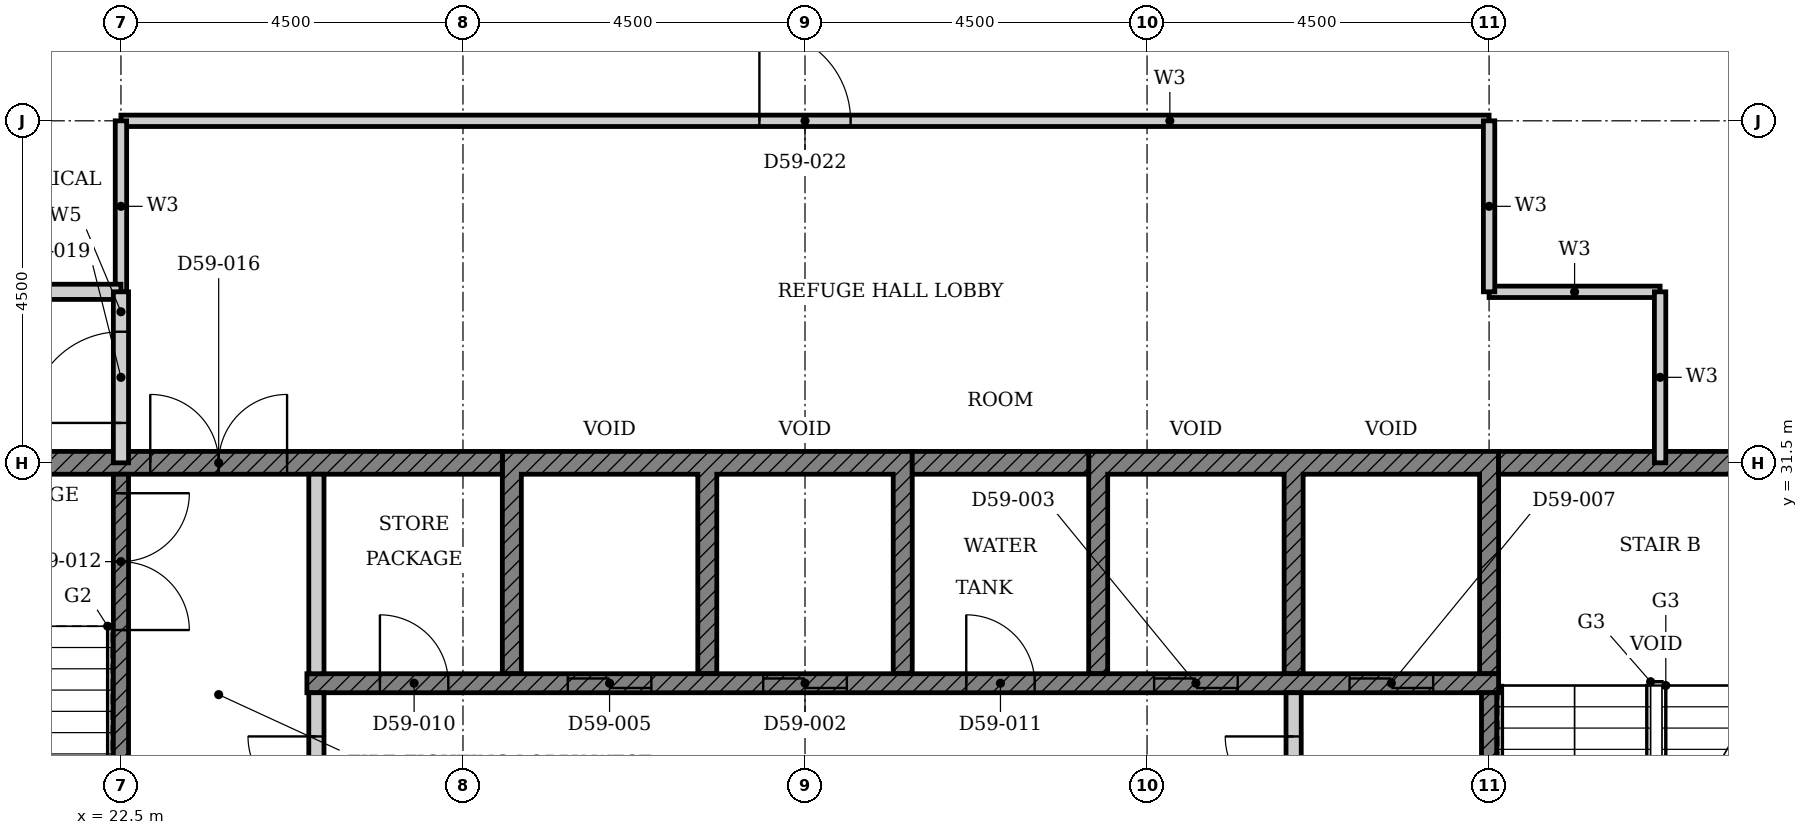
"""IFC4 building model, lengths in metres.
Left out: names, types, materials, properties, quantities, classifications, styles, units other than length and angle.
Written with IfcOpenShell. Run it as: python <this file> out.ifc"""

import sys

from ifc_helpers import new_model, si_unit, direction, frame, frame_2d, origin, place, context, subcontext, project, spatial, polyline, rectangle, outline, extrude, element, fill, save


model = new_model("IFC4")
c1 = context("Model", 3, precision=1e-05, world=origin(), true_north=direction((0.0, 1.0)))
c2 = subcontext(c1, "Body", "Model", "MODEL_VIEW")
j1 = project(units=[si_unit("LENGTHUNIT", "METRE"), si_unit("PLANEANGLEUNIT", "RADIAN")], contexts=[c1])
p1 = place(None, origin())
s1 = spatial("IfcSite", under=j1, at=p1, CompositionType="ELEMENT")
p2 = place(p1, origin())
s2 = spatial("IfcBuilding", under=s1, at=p2, CompositionType="ELEMENT")
p3 = place(p2, frame((0.0, 0.0, 233.1)))
s3 = spatial("IfcBuildingStorey", under=s2, at=p3, CompositionType="ELEMENT", Elevation=233.1)
p4 = place(p3, origin())
e1 = element("IfcWall", 1, at=p4, inside=s3, PredefinedType="SHEAR", context=c2, shape_type="SweptSolid", body=[
    extrude(outline(polyline([(27.518, 28.725), (27.768, 28.725), (27.768, 31.35), (30.089, 31.35), (30.089, 28.725), (30.339, 28.725), (30.339, 31.35), (32.661, 31.35), (32.661, 28.725), (32.911, 28.725), (32.911, 31.65), (27.518, 31.65), (27.518, 28.725)])), origin(), (0.0, 0.0, 1.0), 4.5),
])
p5 = place(p3, origin())
e2 = element("IfcWall", 2, at=p5, inside=s3, PredefinedType="SHEAR", context=c2, shape_type="SweptSolid", body=[
    extrude(outline(polyline([(35.232, 28.725), (35.482, 28.725), (35.482, 31.35), (37.803, 31.35), (37.803, 28.725), (38.053, 28.725), (38.053, 31.35), (40.375, 31.35), (40.375, 28.725), (40.625, 28.725), (40.625, 31.65), (35.232, 31.65), (35.232, 28.725)])), origin(), (0.0, 0.0, 1.0), 4.5),
])
p6 = place(p3, frame((18.15, 31.5, 0.0), z_axis=(0.0, 0.0, 1.0), x_axis=(1.0, 0.0, 0.0)))
e3 = element("IfcWall", 3, at=p6, inside=s3, PredefinedType="SHEAR", context=c2, shape_type="SweptSolid", body=[
    extrude(rectangle(XDim=9.368, YDim=0.3, at=frame_2d((4.684, 0.0))), origin(), (0.0, 0.0, 1.0), 4.5),
])
p7 = place(p6, frame((4.736, 0.0, 0.0)))
e4 = element("IfcOpeningElement", 4, at=p7, cuts=e3, PredefinedType="OPENING", context=c2, shape_type="SweptSolid", body=[
    extrude(rectangle(XDim=1.8, YDim=2.1, at=frame_2d((0.9, 1.05))), frame((0.0, 0.16, 0.0), z_axis=(0.0, -1.0, 0.0), x_axis=(1.0, 0.0, 0.0)), (0.0, 0.0, 1.0), 0.32),
])
p8 = place(p3, frame((32.911, 31.5, 0.0), z_axis=(0.0, 0.0, 1.0), x_axis=(1.0, 0.0, 0.0)))
e5 = element("IfcWall", 5, at=p8, inside=s3, PredefinedType="SHEAR", context=c2, shape_type="SweptSolid", body=[
    extrude(rectangle(XDim=2.322, YDim=0.3, at=frame_2d((1.161, 0.0))), origin(), (0.0, 0.0, 1.0), 4.5),
])
p9 = place(p3, frame((40.625, 31.5, 0.0), z_axis=(0.0, 0.0, 1.0), x_axis=(1.0, 0.0, 0.0)))
e6 = element("IfcWall", 6, at=p9, inside=s3, PredefinedType="SHEAR", context=c2, shape_type="SweptSolid", body=[
    extrude(rectangle(XDim=4.225, YDim=0.3, at=frame_2d((2.113, 0.0))), origin(), (0.0, 0.0, 1.0), 4.5),
])
p10 = place(p3, frame((24.947, 28.6, 0.0), z_axis=(0.0, 0.0, 1.0), x_axis=(1.0, 0.0, 0.0)))
e7 = element("IfcWall", 7, at=p10, inside=s3, PredefinedType="SHEAR", context=c2, shape_type="SweptSolid", body=[
    extrude(rectangle(XDim=15.678, YDim=0.25, at=frame_2d((7.839, 0.0))), origin(), (0.0, 0.0, 1.0), 4.5),
])
p11 = place(p10, frame((6.004, 0.0, 0.0)))
e8 = element("IfcOpeningElement", 8, at=p11, cuts=e7, PredefinedType="OPENING", context=c2, shape_type="SweptSolid", body=[
    extrude(rectangle(XDim=1.1, YDim=2.1, at=frame_2d((0.55, 1.05))), frame((0.0, 0.135, 0.0), z_axis=(0.0, -1.0, 0.0), x_axis=(1.0, 0.0, 0.0)), (0.0, 0.0, 1.0), 0.27),
])
p12 = place(p10, frame((11.146, 0.0, 0.0)))
e9 = element("IfcOpeningElement", 9, at=p12, cuts=e7, PredefinedType="OPENING", context=c2, shape_type="SweptSolid", body=[
    extrude(rectangle(XDim=1.1, YDim=2.1, at=frame_2d((0.55, 1.05))), frame((0.0, 0.135, 0.0), z_axis=(0.0, -1.0, 0.0), x_axis=(1.0, 0.0, 0.0)), (0.0, 0.0, 1.0), 0.27),
])
p13 = place(p10, frame((3.432, 0.0, 0.0)))
e10 = element("IfcOpeningElement", 10, at=p13, cuts=e7, PredefinedType="OPENING", context=c2, shape_type="SweptSolid", body=[
    extrude(rectangle(XDim=1.1, YDim=2.1, at=frame_2d((0.55, 1.05))), frame((0.0, 0.135, 0.0), z_axis=(0.0, -1.0, 0.0), x_axis=(1.0, 0.0, 0.0)), (0.0, 0.0, 1.0), 0.27),
])
p14 = place(p10, frame((13.718, 0.0, 0.0)))
e11 = element("IfcOpeningElement", 11, at=p14, cuts=e7, PredefinedType="OPENING", context=c2, shape_type="SweptSolid", body=[
    extrude(rectangle(XDim=1.1, YDim=2.1, at=frame_2d((0.55, 1.05))), frame((0.0, 0.135, 0.0), z_axis=(0.0, -1.0, 0.0), x_axis=(1.0, 0.0, 0.0)), (0.0, 0.0, 1.0), 0.27),
])
p15 = place(p10, frame((0.961, 0.0, 0.0)))
e12 = element("IfcOpeningElement", 12, at=p15, cuts=e7, PredefinedType="OPENING", context=c2, shape_type="SweptSolid", body=[
    extrude(rectangle(XDim=0.9, YDim=2.1, at=frame_2d((0.45, 1.05))), frame((0.0, 0.135, 0.0), z_axis=(0.0, -1.0, 0.0), x_axis=(1.0, 0.0, 0.0)), (0.0, 0.0, 1.0), 0.27),
])
p16 = place(p10, frame((8.675, 0.0, 0.0)))
e13 = element("IfcOpeningElement", 13, at=p16, cuts=e7, PredefinedType="OPENING", context=c2, shape_type="SweptSolid", body=[
    extrude(rectangle(XDim=0.9, YDim=2.1, at=frame_2d((0.45, 1.05))), frame((0.0, 0.135, 0.0), z_axis=(0.0, -1.0, 0.0), x_axis=(1.0, 0.0, 0.0)), (0.0, 0.0, 1.0), 0.27),
])
p17 = place(p3, frame((25.072, 28.725, 0.0), z_axis=(0.0, 0.0, 1.0), x_axis=(0.0, 1.0, 0.0)))
e14 = element("IfcWall", 14, at=p17, inside=s3, PredefinedType="PARTITIONING", context=c2, shape_type="SweptSolid", body=[
    extrude(rectangle(XDim=2.625, YDim=0.2, at=frame_2d((1.312, 0.0))), origin(), (0.0, 0.0, 1.0), 4.5),
])
p18 = place(p3, frame((22.5, 31.35, 0.0), z_axis=(0.0, 0.0, 1.0), x_axis=(0.0, -1.0, 0.0)))
e15 = element("IfcWall", 15, at=p18, inside=s3, PredefinedType="SHEAR", context=c2, shape_type="SweptSolid", body=[
    extrude(rectangle(XDim=5.825, YDim=0.2, at=frame_2d((2.913, 0.0))), origin(), (0.0, 0.0, 1.0), 4.5),
])
p19 = place(p18, frame((0.25, 0.0, 0.0)))
e16 = element("IfcOpeningElement", 16, at=p19, cuts=e15, PredefinedType="OPENING", context=c2, shape_type="SweptSolid", body=[
    extrude(rectangle(XDim=1.8, YDim=2.1, at=frame_2d((0.9, 1.05))), frame((0.0, 0.11, 0.0), z_axis=(0.0, -1.0, 0.0), x_axis=(1.0, 0.0, 0.0)), (0.0, 0.0, 1.0), 0.22),
])
p20 = place(p3, frame((40.5, 22.65, 0.0), z_axis=(0.0, 0.0, 1.0), x_axis=(0.0, 1.0, 0.0)))
e17 = element("IfcWall", 17, at=p20, inside=s3, PredefinedType="SHEAR", context=c2, shape_type="SweptSolid", body=[
    extrude(rectangle(XDim=5.825, YDim=0.2, at=frame_2d((2.913, 0.0))), origin(), (0.0, 0.0, 1.0), 4.5),
])
p21 = place(p20, frame((0.25, 0.0, 0.0)))
e18 = element("IfcOpeningElement", 18, at=p21, cuts=e17, PredefinedType="OPENING", context=c2, shape_type="SweptSolid", body=[
    extrude(rectangle(XDim=1.8, YDim=2.1, at=frame_2d((0.9, 1.05))), frame((0.0, 0.11, 0.0), z_axis=(0.0, -1.0, 0.0), x_axis=(1.0, 0.0, 0.0)), (0.0, 0.0, 1.0), 0.22),
])
p22 = place(p3, frame((25.072, 25.525, 0.0), z_axis=(0.0, 0.0, 1.0), x_axis=(0.0, 1.0, 0.0)))
e19 = element("IfcWall", 19, at=p22, inside=s3, PredefinedType="PARTITIONING", context=c2, shape_type="SweptSolid", body=[
    extrude(rectangle(XDim=2.95, YDim=0.2, at=frame_2d((1.475, 0.0))), origin(), (0.0, 0.0, 1.0), 4.5),
])
p23 = place(p22, frame((0.575, 0.0, 0.0)))
e20 = element("IfcOpeningElement", 20, at=p23, cuts=e19, PredefinedType="OPENING", context=c2, shape_type="SweptSolid", body=[
    extrude(rectangle(XDim=1.8, YDim=2.1, at=frame_2d((0.9, 1.05))), frame((0.0, 0.11, 0.0), z_axis=(0.0, -1.0, 0.0), x_axis=(1.0, 0.0, 0.0)), (0.0, 0.0, 1.0), 0.22),
])
p24 = place(p3, frame((37.928, 25.525, 0.0), z_axis=(0.0, 0.0, 1.0), x_axis=(0.0, 1.0, 0.0)))
e21 = element("IfcWall", 21, at=p24, inside=s3, PredefinedType="PARTITIONING", context=c2, shape_type="SweptSolid", body=[
    extrude(rectangle(XDim=2.95, YDim=0.2, at=frame_2d((1.475, 0.0))), origin(), (0.0, 0.0, 1.0), 4.5),
])
p25 = place(p24, frame((0.575, 0.0, 0.0)))
e22 = element("IfcOpeningElement", 22, at=p25, cuts=e21, PredefinedType="OPENING", context=c2, shape_type="SweptSolid", body=[
    extrude(rectangle(XDim=1.8, YDim=2.1, at=frame_2d((0.9, 1.05))), frame((0.0, 0.11, 0.0), z_axis=(0.0, -1.0, 0.0), x_axis=(1.0, 0.0, 0.0)), (0.0, 0.0, 1.0), 0.22),
])
p26 = place(p3, frame((40.5, 33.75, 0.0), z_axis=(0.0, 0.0, 1.0), x_axis=(1.0, 0.0, 0.0)))
e23 = element("IfcWall", 23, at=p26, inside=s3, PredefinedType="PARTITIONING", context=c2, shape_type="SweptSolid", body=[
    extrude(rectangle(XDim=2.25, YDim=0.15, at=frame_2d((1.125, 0.0))), origin(), (0.0, 0.0, 1.0), 4.5),
])
p27 = place(p3, frame((22.5, 36.0, 0.0), z_axis=(0.0, 0.0, 1.0), x_axis=(1.0, 0.0, 0.0)))
e24 = element("IfcWall", 24, at=p27, inside=s3, PredefinedType="PARTITIONING", context=c2, shape_type="SweptSolid", body=[
    extrude(rectangle(XDim=18.0, YDim=0.15, at=frame_2d((9.0, 0.0))), origin(), (0.0, 0.0, 1.0), 4.5),
])
p28 = place(p27, frame((8.4, 0.0, 0.0)))
e25 = element("IfcOpeningElement", 25, at=p28, cuts=e24, PredefinedType="OPENING", context=c2, shape_type="SweptSolid", body=[
    extrude(rectangle(XDim=1.2, YDim=2.1, at=frame_2d((0.6, 1.05))), frame((0.0, 0.085, 0.0), z_axis=(0.0, -1.0, 0.0), x_axis=(1.0, 0.0, 0.0)), (0.0, 0.0, 1.0), 0.17),
])
for number, where, z_axis, x_axis in (
    (26, (22.5, 33.75, 0.0), (0.0, 0.0, 1.0), (0.0, 1.0, 0.0)),
    (27, (40.5, 33.75, 0.0), (0.0, 0.0, 1.0), (0.0, 1.0, 0.0)),
    (28, (42.75, 31.5, 0.0), (0.0, 0.0, 1.0), (0.0, 1.0, 0.0)),
):
    element("IfcWall", number, at=place(p3, frame(where, z_axis=z_axis, x_axis=x_axis)), inside=s3, PredefinedType="PARTITIONING", context=c2, shape_type="SweptSolid", body=[
        extrude(rectangle(XDim=2.25, YDim=0.15, at=frame_2d((1.125, 0.0))), origin(), (0.0, 0.0, 1.0), 4.5),
    ])
p29 = place(p3, frame((20.25, 33.75, 0.0), z_axis=(0.0, 0.0, 1.0), x_axis=(1.0, 0.0, 0.0)))
e29 = element("IfcWall", 29, at=p29, inside=s3, PredefinedType="PARTITIONING", context=c2, shape_type="SweptSolid", body=[
    extrude(rectangle(XDim=2.25, YDim=0.2, at=frame_2d((1.125, 0.0))), origin(), (0.0, 0.0, 1.0), 4.5),
])
p30 = place(p3, frame((22.5, 31.5, 0.0), z_axis=(0.0, 0.0, 1.0), x_axis=(0.0, 1.0, 0.0)))
e30 = element("IfcWall", 30, at=p30, inside=s3, PredefinedType="PARTITIONING", context=c2, shape_type="SweptSolid", body=[
    extrude(rectangle(XDim=2.25, YDim=0.2, at=frame_2d((1.125, 0.0))), origin(), (0.0, 0.0, 1.0), 4.5),
])
p31 = place(p30, frame((0.525, 0.0, 0.0)))
e31 = element("IfcOpeningElement", 31, at=p31, cuts=e30, PredefinedType="OPENING", context=c2, shape_type="SweptSolid", body=[
    extrude(rectangle(XDim=1.2, YDim=2.1, at=frame_2d((0.6, 1.05))), frame((0.0, 0.11, 0.0), z_axis=(0.0, -1.0, 0.0), x_axis=(1.0, 0.0, 0.0)), (0.0, 0.0, 1.0), 0.22),
])
p32 = place(p11, origin())
e32 = element("IfcDoor", 32, at=p32, inside=s3, OperationType="DOUBLE_DOOR_SLIDING", PredefinedType="DOOR", context=c2, shape_type="SweptSolid", body=[
    extrude(rectangle(XDim=1.1, YDim=2.1, at=frame_2d((0.55, 1.05))), frame((0.0, 0.025, 0.0), z_axis=(0.0, -1.0, 0.0), x_axis=(1.0, 0.0, 0.0)), (0.0, 0.0, 1.0), 0.05),
])
fill(e8, e32)
p33 = place(p12, origin())
e33 = element("IfcDoor", 33, at=p33, inside=s3, OperationType="DOUBLE_DOOR_SLIDING", PredefinedType="DOOR", context=c2, shape_type="SweptSolid", body=[
    extrude(rectangle(XDim=1.1, YDim=2.1, at=frame_2d((0.55, 1.05))), frame((0.0, 0.025, 0.0), z_axis=(0.0, -1.0, 0.0), x_axis=(1.0, 0.0, 0.0)), (0.0, 0.0, 1.0), 0.05),
])
fill(e9, e33)
p34 = place(p13, origin())
e34 = element("IfcDoor", 34, at=p34, inside=s3, OperationType="DOUBLE_DOOR_SLIDING", PredefinedType="DOOR", context=c2, shape_type="SweptSolid", body=[
    extrude(rectangle(XDim=1.1, YDim=2.1, at=frame_2d((0.55, 1.05))), frame((0.0, 0.025, 0.0), z_axis=(0.0, -1.0, 0.0), x_axis=(1.0, 0.0, 0.0)), (0.0, 0.0, 1.0), 0.05),
])
fill(e10, e34)
p35 = place(p14, origin())
e35 = element("IfcDoor", 35, at=p35, inside=s3, OperationType="DOUBLE_DOOR_SLIDING", PredefinedType="DOOR", context=c2, shape_type="SweptSolid", body=[
    extrude(rectangle(XDim=1.1, YDim=2.1, at=frame_2d((0.55, 1.05))), frame((0.0, 0.025, 0.0), z_axis=(0.0, -1.0, 0.0), x_axis=(1.0, 0.0, 0.0)), (0.0, 0.0, 1.0), 0.05),
])
fill(e11, e35)
p36 = place(p15, origin())
e36 = element("IfcDoor", 36, at=p36, inside=s3, OperationType="SINGLE_SWING_LEFT", PredefinedType="DOOR", context=c2, shape_type="SweptSolid", body=[
    extrude(rectangle(XDim=0.9, YDim=2.1, at=frame_2d((0.45, 1.05))), frame((0.0, 0.025, 0.0), z_axis=(0.0, -1.0, 0.0), x_axis=(1.0, 0.0, 0.0)), (0.0, 0.0, 1.0), 0.05),
])
fill(e12, e36)
p37 = place(p16, origin())
e37 = element("IfcDoor", 37, at=p37, inside=s3, OperationType="SINGLE_SWING_LEFT", PredefinedType="DOOR", context=c2, shape_type="SweptSolid", body=[
    extrude(rectangle(XDim=0.9, YDim=2.1, at=frame_2d((0.45, 1.05))), frame((0.0, 0.025, 0.0), z_axis=(0.0, -1.0, 0.0), x_axis=(1.0, 0.0, 0.0)), (0.0, 0.0, 1.0), 0.05),
])
fill(e13, e37)
p38 = place(p19, origin())
e38 = element("IfcDoor", 38, at=p38, inside=s3, OperationType="DOUBLE_DOOR_SINGLE_SWING", PredefinedType="DOOR", context=c2, shape_type="SweptSolid", body=[
    extrude(rectangle(XDim=1.8, YDim=2.1, at=frame_2d((0.9, 1.05))), frame((0.0, 0.025, 0.0), z_axis=(0.0, -1.0, 0.0), x_axis=(1.0, 0.0, 0.0)), (0.0, 0.0, 1.0), 0.05),
])
fill(e16, e38)
p39 = place(p23, origin())
e39 = element("IfcDoor", 39, at=p39, inside=s3, OperationType="DOUBLE_DOOR_SINGLE_SWING", PredefinedType="DOOR", context=c2, shape_type="SweptSolid", body=[
    extrude(rectangle(XDim=1.8, YDim=2.1, at=frame_2d((0.9, 1.05))), frame((0.0, 0.025, 0.0), z_axis=(0.0, -1.0, 0.0), x_axis=(1.0, 0.0, 0.0)), (0.0, 0.0, 1.0), 0.05),
])
fill(e20, e39)
p40 = place(p25, origin())
e40 = element("IfcDoor", 40, at=p40, inside=s3, OperationType="DOUBLE_DOOR_SINGLE_SWING", PredefinedType="DOOR", context=c2, shape_type="SweptSolid", body=[
    extrude(rectangle(XDim=1.8, YDim=2.1, at=frame_2d((0.9, 1.05))), frame((0.0, 0.025, 0.0), z_axis=(0.0, -1.0, 0.0), x_axis=(1.0, 0.0, 0.0)), (0.0, 0.0, 1.0), 0.05),
])
fill(e22, e40)
p41 = place(p7, origin())
e41 = element("IfcDoor", 41, at=p41, inside=s3, OperationType="DOUBLE_DOOR_SINGLE_SWING", PredefinedType="DOOR", context=c2, shape_type="SweptSolid", body=[
    extrude(rectangle(XDim=1.8, YDim=2.1, at=frame_2d((0.9, 1.05))), frame((0.0, 0.025, 0.0), z_axis=(0.0, -1.0, 0.0), x_axis=(1.0, 0.0, 0.0)), (0.0, 0.0, 1.0), 0.05),
])
fill(e4, e41)
p42 = place(p31, origin())
e42 = element("IfcDoor", 42, at=p42, inside=s3, OperationType="SINGLE_SWING_RIGHT", PredefinedType="DOOR", context=c2, shape_type="SweptSolid", body=[
    extrude(rectangle(XDim=1.2, YDim=2.1, at=frame_2d((0.6, 1.05))), frame((0.0, 0.025, 0.0), z_axis=(0.0, -1.0, 0.0), x_axis=(1.0, 0.0, 0.0)), (0.0, 0.0, 1.0), 0.05),
])
fill(e31, e42)
p43 = place(p28, origin())
e43 = element("IfcDoor", 43, at=p43, inside=s3, OperationType="SINGLE_SWING_RIGHT", PredefinedType="DOOR", context=c2, shape_type="SweptSolid", body=[
    extrude(rectangle(XDim=1.2, YDim=2.1, at=frame_2d((0.6, 1.05))), frame((0.0, 0.025, 0.0), z_axis=(0.0, -1.0, 0.0), x_axis=(1.0, 0.0, 0.0)), (0.0, 0.0, 1.0), 0.05),
])
fill(e25, e43)
save(model, sys.argv[1])
